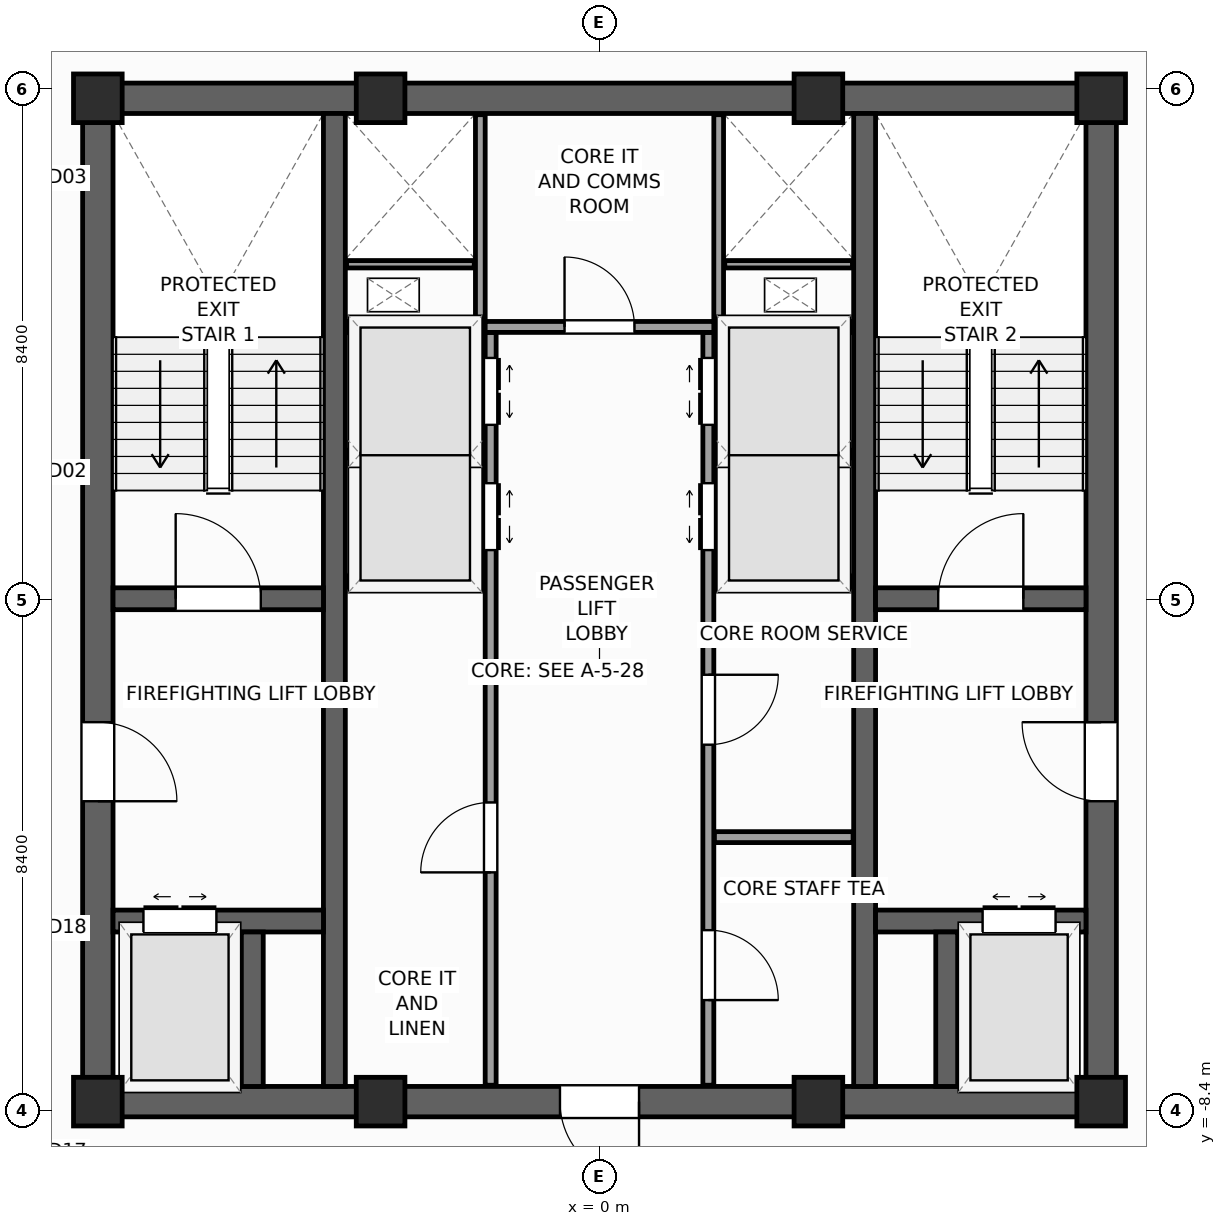
"""IFC4 building model, lengths in metres.
Left out: names, types, materials, properties, quantities, classifications, styles, units other than length and angle.
Written with IfcOpenShell. Run it as: python <this file> out.ifc"""

import sys

from ifc_helpers import new_model, si_unit, direction, frame, frame_2d, origin, origin_2d, place, context, subcontext, project, spatial, rectangle, extrude, source, transform, mapped, element, fill, save


model = new_model("IFC4")
c1 = context("Model", 3, precision=1e-05, world=origin(), true_north=direction((0.0, 1.0)))
c2 = subcontext(c1, "Body", "Model", "MODEL_VIEW")
j1 = project(units=[si_unit("LENGTHUNIT", "METRE"), si_unit("PLANEANGLEUNIT", "RADIAN")], contexts=[c1])
p1 = place(None, origin())
s1 = spatial("IfcSite", under=j1, at=p1, CompositionType="ELEMENT")
p2 = place(p1, origin())
s2 = spatial("IfcBuilding", under=s1, at=p2, CompositionType="ELEMENT")
p3 = place(p2, frame((0.0, 0.0, 268.8)))
s3 = spatial("IfcBuildingStorey", under=s2, at=p3, CompositionType="ELEMENT", Elevation=268.8)
p4 = place(p3, frame((-8.5, -8.25, 0.0), z_axis=(0.0, 0.0, 1.0), x_axis=(1.0, 0.0, 0.0)))
e1 = element("IfcWall", 1, at=p4, inside=s3, PredefinedType="SHEAR", context=c2, shape_type="SweptSolid", body=[
    extrude(rectangle(XDim=17.0, YDim=0.5, at=frame_2d((8.5, 0.0))), origin(), (0.0, 0.0, 1.0), 3.6),
])
p5 = place(p4, frame((7.85, 0.0, 0.0)))
e2 = element("IfcOpeningElement", 2, at=p5, cuts=e1, PredefinedType="OPENING", context=c2, shape_type="SweptSolid", body=[
    extrude(rectangle(XDim=1.3, YDim=2.2, at=frame_2d((0.65, 1.1))), frame((0.0, 0.26, 0.0), z_axis=(0.0, -1.0, 0.0), x_axis=(1.0, 0.0, 0.0)), (0.0, 0.0, 1.0), 0.52),
])
p6 = place(p3, frame((-8.5, 8.25, 0.0), z_axis=(0.0, 0.0, 1.0), x_axis=(1.0, 0.0, 0.0)))
e3 = element("IfcWall", 3, at=p6, inside=s3, PredefinedType="SHEAR", context=c2, shape_type="SweptSolid", body=[
    extrude(rectangle(XDim=17.0, YDim=0.5, at=frame_2d((8.5, 0.0))), origin(), (0.0, 0.0, 1.0), 3.6),
])
p7 = place(p3, frame((-8.25, -8.0, 0.0), z_axis=(0.0, 0.0, 1.0), x_axis=(0.0, 1.0, 0.0)))
e4 = element("IfcWall", 4, at=p7, inside=s3, PredefinedType="SHEAR", context=c2, shape_type="SweptSolid", body=[
    extrude(rectangle(XDim=16.0, YDim=0.5, at=frame_2d((8.0, 0.0))), origin(), (0.0, 0.0, 1.0), 3.6),
])
p8 = place(p7, frame((4.69, 0.0, 0.0)))
e5 = element("IfcOpeningElement", 5, at=p8, cuts=e4, PredefinedType="OPENING", context=c2, shape_type="SweptSolid", body=[
    extrude(rectangle(XDim=1.3, YDim=2.2, at=frame_2d((0.65, 1.1))), frame((0.0, 0.26, 0.0), z_axis=(0.0, -1.0, 0.0), x_axis=(1.0, 0.0, 0.0)), (0.0, 0.0, 1.0), 0.52),
])
p9 = place(p3, frame((8.25, -8.0, 0.0), z_axis=(0.0, 0.0, 1.0), x_axis=(0.0, 1.0, 0.0)))
e6 = element("IfcWall", 6, at=p9, inside=s3, PredefinedType="SHEAR", context=c2, shape_type="SweptSolid", body=[
    extrude(rectangle(XDim=16.0, YDim=0.5, at=frame_2d((8.0, 0.0))), origin(), (0.0, 0.0, 1.0), 3.6),
])
p10 = place(p9, frame((4.69, 0.0, 0.0)))
e7 = element("IfcOpeningElement", 7, at=p10, cuts=e6, PredefinedType="OPENING", context=c2, shape_type="SweptSolid", body=[
    extrude(rectangle(XDim=1.3, YDim=2.2, at=frame_2d((0.65, 1.1))), frame((0.0, 0.26, 0.0), z_axis=(0.0, -1.0, 0.0), x_axis=(1.0, 0.0, 0.0)), (0.0, 0.0, 1.0), 0.52),
])
for number, where, z_axis, x_axis in (
    (8, (-4.36, -8.0, 0.0), (0.0, 0.0, 1.0), (0.0, 1.0, 0.0)),
    (9, (4.36, -8.0, 0.0), (0.0, 0.0, 1.0), (0.0, 1.0, 0.0)),
):
    element("IfcWall", number, at=place(p3, frame(where, z_axis=z_axis, x_axis=x_axis)), inside=s3, PredefinedType="SHEAR", context=c2, shape_type="SweptSolid", body=[
        extrude(rectangle(XDim=16.0, YDim=0.36, at=frame_2d((8.0, 0.0))), origin(), (0.0, 0.0, 1.0), 3.6),
    ])
p11 = place(p3, frame((-8.0, 0.02, 0.0), z_axis=(0.0, 0.0, 1.0), x_axis=(1.0, 0.0, 0.0)))
e10 = element("IfcWall", 10, at=p11, inside=s3, PredefinedType="SHEAR", context=c2, shape_type="SweptSolid", body=[
    extrude(rectangle(XDim=3.46, YDim=0.36, at=frame_2d((1.73, 0.0))), origin(), (0.0, 0.0, 1.0), 3.6),
])
p12 = place(p11, frame((1.03, 0.0, 0.0)))
e11 = element("IfcOpeningElement", 11, at=p12, cuts=e10, PredefinedType="OPENING", context=c2, shape_type="SweptSolid", body=[
    extrude(rectangle(XDim=1.4, YDim=2.2, at=frame_2d((0.7, 1.1))), frame((0.0, 0.19, 0.0), z_axis=(0.0, -1.0, 0.0), x_axis=(1.0, 0.0, 0.0)), (0.0, 0.0, 1.0), 0.38),
])
p13 = place(p3, frame((4.54, 0.02, 0.0), z_axis=(0.0, 0.0, 1.0), x_axis=(1.0, 0.0, 0.0)))
e12 = element("IfcWall", 12, at=p13, inside=s3, PredefinedType="SHEAR", context=c2, shape_type="SweptSolid", body=[
    extrude(rectangle(XDim=3.46, YDim=0.36, at=frame_2d((1.73, 0.0))), origin(), (0.0, 0.0, 1.0), 3.6),
])
p14 = place(p13, frame((1.03, 0.0, 0.0)))
e13 = element("IfcOpeningElement", 13, at=p14, cuts=e12, PredefinedType="OPENING", context=c2, shape_type="SweptSolid", body=[
    extrude(rectangle(XDim=1.4, YDim=2.2, at=frame_2d((0.7, 1.1))), frame((0.0, 0.19, 0.0), z_axis=(0.0, -1.0, 0.0), x_axis=(1.0, 0.0, 0.0)), (0.0, 0.0, 1.0), 0.38),
])
p15 = place(p3, frame((-8.0, -5.28, 0.0), z_axis=(0.0, 0.0, 1.0), x_axis=(1.0, 0.0, 0.0)))
e14 = element("IfcWall", 14, at=p15, inside=s3, PredefinedType="SHEAR", context=c2, shape_type="SweptSolid", body=[
    extrude(rectangle(XDim=3.46, YDim=0.36, at=frame_2d((1.73, 0.0))), origin(), (0.0, 0.0, 1.0), 3.6),
])
p16 = place(p15, frame((0.5, 0.0, 0.0)))
e15 = element("IfcOpeningElement", 15, at=p16, cuts=e14, PredefinedType="OPENING", context=c2, shape_type="SweptSolid", body=[
    extrude(rectangle(XDim=1.2, YDim=2.25, at=frame_2d((0.6, 1.125))), frame((0.0, 0.19, 0.0), z_axis=(0.0, -1.0, 0.0), x_axis=(1.0, 0.0, 0.0)), (0.0, 0.0, 1.0), 0.38),
])
p17 = place(p3, frame((4.54, -5.28, 0.0), z_axis=(0.0, 0.0, 1.0), x_axis=(1.0, 0.0, 0.0)))
e16 = element("IfcWall", 16, at=p17, inside=s3, PredefinedType="SHEAR", context=c2, shape_type="SweptSolid", body=[
    extrude(rectangle(XDim=3.46, YDim=0.36, at=frame_2d((1.73, 0.0))), origin(), (0.0, 0.0, 1.0), 3.6),
])
p18 = place(p17, frame((1.76, 0.0, 0.0)))
e17 = element("IfcOpeningElement", 17, at=p18, cuts=e16, PredefinedType="OPENING", context=c2, shape_type="SweptSolid", body=[
    extrude(rectangle(XDim=1.2, YDim=2.25, at=frame_2d((0.6, 1.125))), frame((0.0, 0.19, 0.0), z_axis=(0.0, -1.0, 0.0), x_axis=(1.0, 0.0, 0.0)), (0.0, 0.0, 1.0), 0.38),
])
for number, where, z_axis, x_axis in (
    (18, (-5.71, -8.0, 0.0), (0.0, 0.0, 1.0), (0.0, 1.0, 0.0)),
    (19, (5.71, -8.0, 0.0), (0.0, 0.0, 1.0), (0.0, 1.0, 0.0)),
):
    element("IfcWall", number, at=place(p3, frame(where, z_axis=z_axis, x_axis=x_axis)), inside=s3, PredefinedType="SHEAR", context=c2, shape_type="SweptSolid", body=[
        extrude(rectangle(XDim=2.54, YDim=0.36, at=frame_2d((1.27, 0.0))), origin(), (0.0, 0.0, 1.0), 3.6),
    ])
m1 = source(origin(), c2, "Body", "SweptSolid", [
    extrude(rectangle(XDim=0.8, YDim=0.8, at=origin_2d()), origin(), (0.0, 0.0, 1.0), 3.6),
])
for number, where, z_axis, x_axis in (
    (20, (-8.25, -8.25, 0.0), (0.0, 0.0, 1.0), (1.0, 0.0, 0.0)),
    (21, (8.25, -8.25, 0.0), (0.0, 0.0, 1.0), (1.0, 0.0, 0.0)),
    (22, (8.25, 8.25, 0.0), (0.0, 0.0, 1.0), (1.0, 0.0, 0.0)),
    (23, (-8.25, 8.25, 0.0), (0.0, 0.0, 1.0), (1.0, 0.0, 0.0)),
    (24, (-3.6, -8.25, 0.0), (0.0, 0.0, 1.0), (1.0, 0.0, 0.0)),
    (25, (3.6, -8.25, 0.0), (0.0, 0.0, 1.0), (1.0, 0.0, 0.0)),
    (26, (-3.6, 8.25, 0.0), (0.0, 0.0, 1.0), (1.0, 0.0, 0.0)),
    (27, (3.6, 8.25, 0.0), (0.0, 0.0, 1.0), (1.0, 0.0, 0.0)),
):
    element("IfcColumn", number, at=place(p3, frame(where, z_axis=z_axis, x_axis=x_axis)), inside=s3, PredefinedType="PILASTER", context=c2, shape_type="MappedRepresentation", body=[
        mapped(m1, transform((0.0, 0.0, 0.0), scale=1.0)),
    ])
p19 = place(p3, frame((-1.79, -7.98, 0.0), z_axis=(0.0, 0.0, 1.0), x_axis=(0.0, 1.0, 0.0)))
e28 = element("IfcWall", 28, at=p19, inside=s3, PredefinedType="PARTITIONING", context=c2, shape_type="SweptSolid", body=[
    extrude(rectangle(XDim=12.38, YDim=0.18, at=frame_2d((6.19, 0.0))), origin(), (0.0, 0.0, 1.0), 3.35),
])
p20 = place(p19, frame((8.8, 0.0, 0.0)))
e29 = element("IfcOpeningElement", 29, at=p20, cuts=e28, PredefinedType="OPENING", context=c2, shape_type="SweptSolid", body=[
    extrude(rectangle(XDim=1.1, YDim=2.2, at=frame_2d((0.55, 1.1))), frame((0.0, 0.1, 0.0), z_axis=(0.0, -1.0, 0.0), x_axis=(1.0, 0.0, 0.0)), (0.0, 0.0, 1.0), 0.2),
])
p21 = place(p19, frame((10.86, 0.0, 0.0)))
e30 = element("IfcOpeningElement", 30, at=p21, cuts=e28, PredefinedType="OPENING", context=c2, shape_type="SweptSolid", body=[
    extrude(rectangle(XDim=1.1, YDim=2.2, at=frame_2d((0.55, 1.1))), frame((0.0, 0.1, 0.0), z_axis=(0.0, -1.0, 0.0), x_axis=(1.0, 0.0, 0.0)), (0.0, 0.0, 1.0), 0.2),
])
p22 = place(p19, frame((3.5, 0.0, 0.0)))
e31 = element("IfcOpeningElement", 31, at=p22, cuts=e28, PredefinedType="OPENING", context=c2, shape_type="SweptSolid", body=[
    extrude(rectangle(XDim=1.15, YDim=2.25, at=frame_2d((0.575, 1.125))), frame((0.0, 0.1, 0.0), z_axis=(0.0, -1.0, 0.0), x_axis=(1.0, 0.0, 0.0)), (0.0, 0.0, 1.0), 0.2),
])
p23 = place(p3, frame((1.79, -7.98, 0.0), z_axis=(0.0, 0.0, 1.0), x_axis=(0.0, 1.0, 0.0)))
e32 = element("IfcWall", 32, at=p23, inside=s3, PredefinedType="PARTITIONING", context=c2, shape_type="SweptSolid", body=[
    extrude(rectangle(XDim=12.38, YDim=0.18, at=frame_2d((6.19, 0.0))), origin(), (0.0, 0.0, 1.0), 3.35),
])
p24 = place(p23, frame((8.8, 0.0, 0.0)))
e33 = element("IfcOpeningElement", 33, at=p24, cuts=e32, PredefinedType="OPENING", context=c2, shape_type="SweptSolid", body=[
    extrude(rectangle(XDim=1.1, YDim=2.2, at=frame_2d((0.55, 1.1))), frame((0.0, 0.1, 0.0), z_axis=(0.0, -1.0, 0.0), x_axis=(1.0, 0.0, 0.0)), (0.0, 0.0, 1.0), 0.2),
])
p25 = place(p23, frame((10.86, 0.0, 0.0)))
e34 = element("IfcOpeningElement", 34, at=p25, cuts=e32, PredefinedType="OPENING", context=c2, shape_type="SweptSolid", body=[
    extrude(rectangle(XDim=1.1, YDim=2.2, at=frame_2d((0.55, 1.1))), frame((0.0, 0.1, 0.0), z_axis=(0.0, -1.0, 0.0), x_axis=(1.0, 0.0, 0.0)), (0.0, 0.0, 1.0), 0.2),
])
p26 = place(p23, frame((1.4, 0.0, 0.0)))
e35 = element("IfcOpeningElement", 35, at=p26, cuts=e32, PredefinedType="OPENING", context=c2, shape_type="SweptSolid", body=[
    extrude(rectangle(XDim=1.15, YDim=2.25, at=frame_2d((0.575, 1.125))), frame((0.0, 0.1, 0.0), z_axis=(0.0, -1.0, 0.0), x_axis=(1.0, 0.0, 0.0)), (0.0, 0.0, 1.0), 0.2),
])
p27 = place(p23, frame((5.6, 0.0, 0.0)))
e36 = element("IfcOpeningElement", 36, at=p27, cuts=e32, PredefinedType="OPENING", context=c2, shape_type="SweptSolid", body=[
    extrude(rectangle(XDim=1.15, YDim=2.25, at=frame_2d((0.575, 1.125))), frame((0.0, 0.1, 0.0), z_axis=(0.0, -1.0, 0.0), x_axis=(1.0, 0.0, 0.0)), (0.0, 0.0, 1.0), 0.2),
])
p28 = place(p3, frame((-1.88, 4.49, 0.0), z_axis=(0.0, 0.0, 1.0), x_axis=(1.0, 0.0, 0.0)))
e37 = element("IfcWall", 37, at=p28, inside=s3, PredefinedType="PARTITIONING", context=c2, shape_type="SweptSolid", body=[
    extrude(rectangle(XDim=3.76, YDim=0.18, at=frame_2d((1.88, 0.0))), origin(), (0.0, 0.0, 1.0), 3.35),
])
p29 = place(p28, frame((1.305, 0.0, 0.0)))
e38 = element("IfcOpeningElement", 38, at=p29, cuts=e37, PredefinedType="OPENING", context=c2, shape_type="SweptSolid", body=[
    extrude(rectangle(XDim=1.15, YDim=2.25, at=frame_2d((0.575, 1.125))), frame((0.0, 0.1, 0.0), z_axis=(0.0, -1.0, 0.0), x_axis=(1.0, 0.0, 0.0)), (0.0, 0.0, 1.0), 0.2),
])
for number, where, z_axis, x_axis in (
    (39, (1.89, -3.9, 0.0), (0.0, 0.0, 1.0), (1.0, 0.0, 0.0)),
    (40, (-4.17, 0.3, 0.0), (0.0, 0.0, 1.0), (1.0, 0.0, 0.0)),
    (41, (1.89, 0.3, 0.0), (0.0, 0.0, 1.0), (1.0, 0.0, 0.0)),
    (42, (-4.17, 4.49, 0.0), (0.0, 0.0, 1.0), (1.0, 0.0, 0.0)),
    (43, (1.89, 4.49, 0.0), (0.0, 0.0, 1.0), (1.0, 0.0, 0.0)),
):
    element("IfcWall", number, at=place(p3, frame(where, z_axis=z_axis, x_axis=x_axis)), inside=s3, PredefinedType="PARTITIONING", context=c2, shape_type="SweptSolid", body=[
        extrude(rectangle(XDim=2.28, YDim=0.18, at=frame_2d((1.14, 0.0))), origin(), (0.0, 0.0, 1.0), 3.35),
    ])
for number, where, z_axis, x_axis in (
    (44, (-4.16, 2.4, 0.0), (0.0, 0.0, 1.0), (1.0, 0.0, 0.0)),
    (45, (1.9, 2.4, 0.0), (0.0, 0.0, 1.0), (1.0, 0.0, 0.0)),
):
    element("IfcWall", number, at=place(p3, frame(where, z_axis=z_axis, x_axis=x_axis)), inside=s3, PredefinedType="PARTITIONING", context=c2, shape_type="SweptSolid", body=[
        extrude(rectangle(XDim=2.26, YDim=0.12, at=frame_2d((1.13, 0.0))), origin(), (0.0, 0.0, 1.0), 3.35),
    ])
for number, where, z_axis, x_axis in (
    (46, (-1.96, 4.58, 0.0), (0.0, 0.0, 1.0), (0.0, 1.0, 0.0)),
    (47, (1.96, 4.58, 0.0), (0.0, 0.0, 1.0), (0.0, 1.0, 0.0)),
):
    element("IfcWall", number, at=place(p3, frame(where, z_axis=z_axis, x_axis=x_axis)), inside=s3, PredefinedType="PARTITIONING", context=c2, shape_type="SweptSolid", body=[
        extrude(rectangle(XDim=3.4, YDim=0.16, at=frame_2d((1.7, 0.0))), origin(), (0.0, 0.0, 1.0), 3.35),
    ])
for number, where, z_axis, x_axis in (
    (48, (-4.16, 5.52, 0.0), (0.0, 0.0, 1.0), (1.0, 0.0, 0.0)),
    (49, (2.06, 5.52, 0.0), (0.0, 0.0, 1.0), (1.0, 0.0, 0.0)),
):
    element("IfcWall", number, at=place(p3, frame(where, z_axis=z_axis, x_axis=x_axis)), inside=s3, PredefinedType="PARTITIONING", context=c2, shape_type="SweptSolid", body=[
        extrude(rectangle(XDim=2.1, YDim=0.12, at=frame_2d((1.05, 0.0))), origin(), (0.0, 0.0, 1.0), 3.35),
    ])
m2 = source(origin(), c2, "Body", "SweptSolid", [
    extrude(rectangle(XDim=1.4, YDim=2.2, at=frame_2d((0.7, 1.1))), frame((0.0, 0.025, 0.0), z_axis=(0.0, -1.0, 0.0), x_axis=(1.0, 0.0, 0.0)), (0.0, 0.0, 1.0), 0.05),
])
p30 = place(p12, origin())
e50 = element("IfcDoor", 50, at=p30, inside=s3, OperationType="SINGLE_SWING_LEFT", PredefinedType="DOOR", context=c2, shape_type="MappedRepresentation", body=[
    mapped(m2, transform((0.0, 0.0, 0.0), scale=1.0)),
])
fill(e11, e50)
p31 = place(p14, origin())
e51 = element("IfcDoor", 51, at=p31, inside=s3, OperationType="SINGLE_SWING_RIGHT", PredefinedType="DOOR", context=c2, shape_type="MappedRepresentation", body=[
    mapped(m2, transform((0.0, 0.0, 0.0), scale=1.0)),
])
fill(e13, e51)
m3 = source(origin(), c2, "Body", "SweptSolid", [
    extrude(rectangle(XDim=1.3, YDim=2.2, at=frame_2d((0.65, 1.1))), frame((0.0, 0.025, 0.0), z_axis=(0.0, -1.0, 0.0), x_axis=(1.0, 0.0, 0.0)), (0.0, 0.0, 1.0), 0.05),
])
p32 = place(p8, frame((1.3, 0.0, 0.0), z_axis=(0.0, 0.0, 1.0), x_axis=(-1.0, 0.0, 0.0)))
e52 = element("IfcDoor", 52, at=p32, inside=s3, OperationType="SINGLE_SWING_LEFT", PredefinedType="DOOR", context=c2, shape_type="MappedRepresentation", body=[
    mapped(m3, transform((0.0, 0.0, 0.0), scale=1.0)),
])
fill(e5, e52)
p33 = place(p10, origin())
e53 = element("IfcDoor", 53, at=p33, inside=s3, OperationType="SINGLE_SWING_RIGHT", PredefinedType="DOOR", context=c2, shape_type="MappedRepresentation", body=[
    mapped(m3, transform((0.0, 0.0, 0.0), scale=1.0)),
])
fill(e7, e53)
p34 = place(p5, frame((1.3, 0.0, 0.0), z_axis=(0.0, 0.0, 1.0), x_axis=(-1.0, 0.0, 0.0)))
e54 = element("IfcDoor", 54, at=p34, inside=s3, OperationType="SINGLE_SWING_RIGHT", PredefinedType="DOOR", context=c2, shape_type="MappedRepresentation", body=[
    mapped(m3, transform((0.0, 0.0, 0.0), scale=1.0)),
])
fill(e2, e54)
m4 = source(origin(), c2, "Body", "SweptSolid", [
    extrude(rectangle(XDim=1.2, YDim=2.25, at=frame_2d((0.6, 1.125))), frame((0.0, 0.025, 0.0), z_axis=(0.0, -1.0, 0.0), x_axis=(1.0, 0.0, 0.0)), (0.0, 0.0, 1.0), 0.05),
])
p35 = place(p16, origin())
e55 = element("IfcDoor", 55, at=p35, inside=s3, OperationType="DOUBLE_DOOR_SLIDING", PredefinedType="DOOR", context=c2, shape_type="MappedRepresentation", body=[
    mapped(m4, transform((0.0, 0.0, 0.0), scale=1.0)),
])
fill(e15, e55)
p36 = place(p18, origin())
e56 = element("IfcDoor", 56, at=p36, inside=s3, OperationType="DOUBLE_DOOR_SLIDING", PredefinedType="DOOR", context=c2, shape_type="MappedRepresentation", body=[
    mapped(m4, transform((0.0, 0.0, 0.0), scale=1.0)),
])
fill(e17, e56)
m5 = source(origin(), c2, "Body", "SweptSolid", [
    extrude(rectangle(XDim=1.1, YDim=2.2, at=frame_2d((0.55, 1.1))), frame((0.0, 0.025, 0.0), z_axis=(0.0, -1.0, 0.0), x_axis=(1.0, 0.0, 0.0)), (0.0, 0.0, 1.0), 0.05),
])
p37 = place(p20, frame((1.1, 0.0, 0.0), z_axis=(0.0, 0.0, 1.0), x_axis=(-1.0, 0.0, 0.0)))
e57 = element("IfcDoor", 57, at=p37, inside=s3, OperationType="DOUBLE_DOOR_SLIDING", PredefinedType="DOOR", context=c2, shape_type="MappedRepresentation", body=[
    mapped(m5, transform((0.0, 0.0, 0.0), scale=1.0)),
])
fill(e29, e57)
p38 = place(p21, frame((1.1, 0.0, 0.0), z_axis=(0.0, 0.0, 1.0), x_axis=(-1.0, 0.0, 0.0)))
e58 = element("IfcDoor", 58, at=p38, inside=s3, OperationType="DOUBLE_DOOR_SLIDING", PredefinedType="DOOR", context=c2, shape_type="MappedRepresentation", body=[
    mapped(m5, transform((0.0, 0.0, 0.0), scale=1.0)),
])
fill(e30, e58)
p39 = place(p24, origin())
e59 = element("IfcDoor", 59, at=p39, inside=s3, OperationType="DOUBLE_DOOR_SLIDING", PredefinedType="DOOR", context=c2, shape_type="MappedRepresentation", body=[
    mapped(m5, transform((0.0, 0.0, 0.0), scale=1.0)),
])
fill(e33, e59)
p40 = place(p25, origin())
e60 = element("IfcDoor", 60, at=p40, inside=s3, OperationType="DOUBLE_DOOR_SLIDING", PredefinedType="DOOR", context=c2, shape_type="MappedRepresentation", body=[
    mapped(m5, transform((0.0, 0.0, 0.0), scale=1.0)),
])
fill(e34, e60)
m6 = source(origin(), c2, "Body", "SweptSolid", [
    extrude(rectangle(XDim=1.15, YDim=2.25, at=frame_2d((0.575, 1.125))), frame((0.0, 0.025, 0.0), z_axis=(0.0, -1.0, 0.0), x_axis=(1.0, 0.0, 0.0)), (0.0, 0.0, 1.0), 0.05),
])
p41 = place(p22, origin())
e61 = element("IfcDoor", 61, at=p41, inside=s3, OperationType="SINGLE_SWING_LEFT", PredefinedType="DOOR", context=c2, shape_type="MappedRepresentation", body=[
    mapped(m6, transform((0.0, 0.0, 0.0), scale=1.0)),
])
fill(e31, e61)
p42 = place(p26, frame((1.15, 0.0, 0.0), z_axis=(0.0, 0.0, 1.0), x_axis=(-1.0, 0.0, 0.0)))
e62 = element("IfcDoor", 62, at=p42, inside=s3, OperationType="SINGLE_SWING_LEFT", PredefinedType="DOOR", context=c2, shape_type="MappedRepresentation", body=[
    mapped(m6, transform((0.0, 0.0, 0.0), scale=1.0)),
])
fill(e35, e62)
p43 = place(p27, frame((1.15, 0.0, 0.0), z_axis=(0.0, 0.0, 1.0), x_axis=(-1.0, 0.0, 0.0)))
e63 = element("IfcDoor", 63, at=p43, inside=s3, OperationType="SINGLE_SWING_RIGHT", PredefinedType="DOOR", context=c2, shape_type="MappedRepresentation", body=[
    mapped(m6, transform((0.0, 0.0, 0.0), scale=1.0)),
])
fill(e36, e63)
p44 = place(p29, origin())
e64 = element("IfcDoor", 64, at=p44, inside=s3, OperationType="SINGLE_SWING_LEFT", PredefinedType="DOOR", context=c2, shape_type="MappedRepresentation", body=[
    mapped(m6, transform((0.0, 0.0, 0.0), scale=1.0)),
])
fill(e38, e64)
save(model, sys.argv[1])
